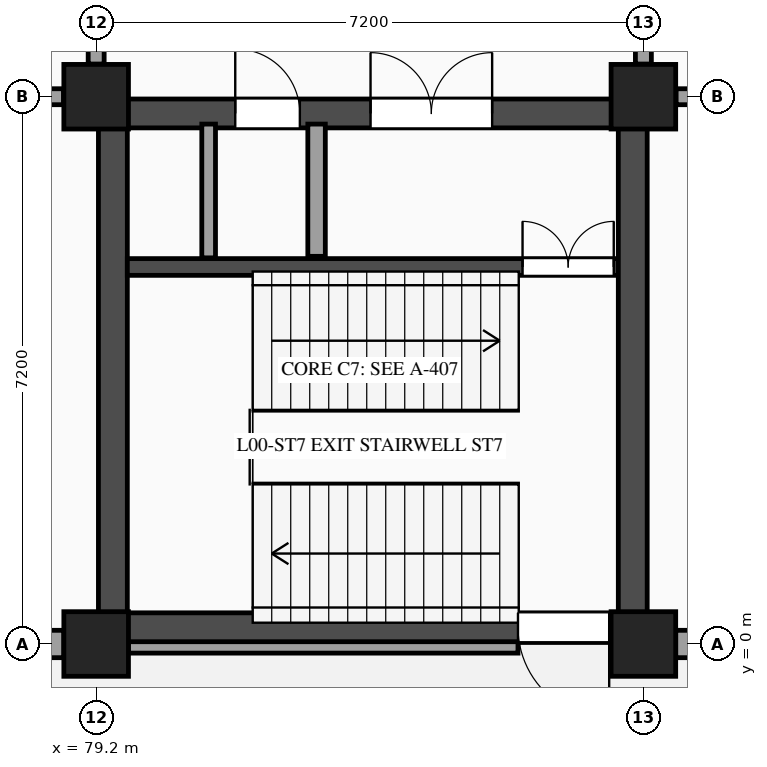
"""IFC4 building model, lengths in metres.
Left out: names, types, materials, properties, quantities, classifications, styles, units other than length and angle.
Written with IfcOpenShell. Run it as: python <this file> out.ifc"""

import sys

from ifc_helpers import new_model, si_unit, direction, frame, frame_2d, origin, origin_2d, place, context, subcontext, project, spatial, rectangle, extrude, element, fill, save


model = new_model("IFC4")
c1 = context("Model", 3, precision=1e-05, world=origin(), true_north=direction((0.0, 1.0)))
c2 = subcontext(c1, "Body", "Model", "MODEL_VIEW")
j1 = project(units=[si_unit("LENGTHUNIT", "METRE"), si_unit("PLANEANGLEUNIT", "RADIAN")], contexts=[c1])
p1 = place(None, origin())
s1 = spatial("IfcSite", under=j1, at=p1, CompositionType="ELEMENT")
p2 = place(p1, origin())
s2 = spatial("IfcBuilding", under=s1, at=p2, CompositionType="ELEMENT")
p3 = place(p2, origin())
s3 = spatial("IfcBuildingStorey", under=s2, at=p3, CompositionType="ELEMENT", Elevation=0.0)
for number, where, z_axis, x_axis in (
    (1, (79.2, 0.0, 0.0), (0.0, 0.0, 1.0), (1.0, 0.0, 0.0)),
    (2, (79.2, 7.2, 0.0), (0.0, 0.0, 1.0), (1.0, 0.0, 0.0)),
    (3, (86.4, 0.0, 0.0), (0.0, 0.0, 1.0), (1.0, 0.0, 0.0)),
    (4, (86.4, 7.2, 0.0), (0.0, 0.0, 1.0), (1.0, 0.0, 0.0)),
):
    element("IfcColumn", number, at=place(p3, frame(where, z_axis=z_axis, x_axis=x_axis)), inside=s3, PredefinedType="COLUMN", context=c2, shape_type="SweptSolid", body=[
        extrude(rectangle(XDim=0.85, YDim=0.85, at=origin_2d()), origin(), (0.0, 0.0, 1.0), 5.4),
    ])
p4 = place(p3, frame((93.225, 0.0, 0.0), z_axis=(0.0, 0.0, 1.0), x_axis=(-1.0, 0.0, 0.0)))
e5 = element("IfcWall", 5, at=p4, inside=s3, PredefinedType="STANDARD", context=c2, shape_type="SweptSolid", body=[
    extrude(rectangle(XDim=6.4, YDim=0.36, at=frame_2d((3.2, 0.0))), origin(), (0.0, 0.0, 1.0), 4.37),
])
p5 = place(p4, frame((1.345, 0.0, 1.15)))
e6 = element("IfcOpeningElement", 6, at=p5, cuts=e5, PredefinedType="OPENING", context=c2, shape_type="SweptSolid", body=[
    extrude(rectangle(XDim=1.15, YDim=1.2, at=frame_2d((0.575, 0.6))), frame((0.0, 0.19, 0.0), z_axis=(0.0, -1.0, 0.0), x_axis=(1.0, 0.0, 0.0)), (0.0, 0.0, 1.0), 0.38),
])
p6 = place(p4, frame((3.905, 0.0, 1.15)))
e7 = element("IfcOpeningElement", 7, at=p6, cuts=e5, PredefinedType="OPENING", context=c2, shape_type="SweptSolid", body=[
    extrude(rectangle(XDim=1.15, YDim=1.2, at=frame_2d((0.575, 0.6))), frame((0.0, 0.19, 0.0), z_axis=(0.0, -1.0, 0.0), x_axis=(1.0, 0.0, 0.0)), (0.0, 0.0, 1.0), 0.38),
])
p7 = place(p3, frame((84.75, 0.0, 0.0), z_axis=(0.0, 0.0, 1.0), x_axis=(-1.0, 0.0, 0.0)))
e8 = element("IfcWall", 8, at=p7, inside=s3, PredefinedType="STANDARD", context=c2, shape_type="SweptSolid", body=[
    extrude(rectangle(XDim=5.125, YDim=0.24, at=frame_2d((2.562, 0.0))), origin(), (0.0, 0.0, 1.0), 4.37),
])
p8 = place(p3, frame((78.775, 0.0, 0.0), z_axis=(0.0, 0.0, 1.0), x_axis=(-1.0, 0.0, 0.0)))
e9 = element("IfcWall", 9, at=p8, inside=s3, PredefinedType="STANDARD", context=c2, shape_type="SweptSolid", body=[
    extrude(rectangle(XDim=6.4, YDim=0.36, at=frame_2d((3.2, 0.0))), origin(), (0.0, 0.0, 1.0), 4.37),
])
p9 = place(p8, frame((1.495, 0.0, 1.15)))
e10 = element("IfcOpeningElement", 10, at=p9, cuts=e9, PredefinedType="OPENING", context=c2, shape_type="SweptSolid", body=[
    extrude(rectangle(XDim=0.85, YDim=1.25, at=frame_2d((0.425, 0.625))), frame((0.0, 0.19, 0.0), z_axis=(0.0, -1.0, 0.0), x_axis=(1.0, 0.0, 0.0)), (0.0, 0.0, 1.0), 0.38),
])
p10 = place(p8, frame((4.055, 0.0, 1.15)))
e11 = element("IfcOpeningElement", 11, at=p10, cuts=e9, PredefinedType="OPENING", context=c2, shape_type="SweptSolid", body=[
    extrude(rectangle(XDim=0.85, YDim=1.25, at=frame_2d((0.425, 0.625))), frame((0.0, 0.19, 0.0), z_axis=(0.0, -1.0, 0.0), x_axis=(1.0, 0.0, 0.0)), (0.0, 0.0, 1.0), 0.38),
])
p11 = place(p3, frame((79.61, 0.22, 0.0), z_axis=(0.0, 0.0, 1.0), x_axis=(1.0, 0.0, 0.0)))
e12 = element("IfcWall", 12, at=p11, inside=s3, PredefinedType="SHEAR", context=c2, shape_type="SweptSolid", body=[
    extrude(rectangle(XDim=6.46, YDim=0.38, at=frame_2d((3.23, 0.0))), origin(), (0.0, 0.0, 1.0), 5.09),
])
p12 = place(p11, frame((5.14, 0.0, 0.0)))
e13 = element("IfcOpeningElement", 13, at=p12, cuts=e12, PredefinedType="OPENING", context=c2, shape_type="SweptSolid", body=[
    extrude(rectangle(XDim=1.2, YDim=2.2, at=frame_2d((0.6, 1.1))), frame((0.0, 0.2, 0.0), z_axis=(0.0, -1.0, 0.0), x_axis=(1.0, 0.0, 0.0)), (0.0, 0.0, 1.0), 0.4),
])
p13 = place(p3, frame((79.42, 7.17, 0.0), z_axis=(0.0, 0.0, 1.0), x_axis=(0.0, -1.0, 0.0)))
e14 = element("IfcWall", 14, at=p13, inside=s3, PredefinedType="SHEAR", context=c2, shape_type="SweptSolid", body=[
    extrude(rectangle(XDim=7.14, YDim=0.38, at=frame_2d((3.57, 0.0))), origin(), (0.0, 0.0, 1.0), 5.09),
])
p14 = place(p3, frame((79.61, 6.98, 0.0), z_axis=(0.0, 0.0, 1.0), x_axis=(1.0, 0.0, 0.0)))
e15 = element("IfcWall", 15, at=p14, inside=s3, PredefinedType="SHEAR", context=c2, shape_type="SweptSolid", body=[
    extrude(rectangle(XDim=6.46, YDim=0.38, at=frame_2d((3.23, 0.0))), origin(), (0.0, 0.0, 1.0), 5.09),
])
p15 = place(p14, frame((1.42, 0.0, 0.0)))
e16 = element("IfcOpeningElement", 16, at=p15, cuts=e15, PredefinedType="OPENING", context=c2, shape_type="SweptSolid", body=[
    extrude(rectangle(XDim=0.85, YDim=2.1, at=frame_2d((0.425, 1.05))), frame((0.0, 0.2, 0.0), z_axis=(0.0, -1.0, 0.0), x_axis=(1.0, 0.0, 0.0)), (0.0, 0.0, 1.0), 0.4),
])
p16 = place(p14, frame((3.2, 0.0, 0.0)))
e17 = element("IfcOpeningElement", 17, at=p16, cuts=e15, PredefinedType="OPENING", context=c2, shape_type="SweptSolid", body=[
    extrude(rectangle(XDim=1.6, YDim=2.2, at=frame_2d((0.8, 1.1))), frame((0.0, 0.2, 0.0), z_axis=(0.0, -1.0, 0.0), x_axis=(1.0, 0.0, 0.0)), (0.0, 0.0, 1.0), 0.4),
])
p17 = place(p3, frame((79.61, 4.96, 0.0), z_axis=(0.0, 0.0, 1.0), x_axis=(1.0, 0.0, 0.0)))
e18 = element("IfcWall", 18, at=p17, inside=s3, PredefinedType="SHEAR", context=c2, shape_type="SweptSolid", body=[
    extrude(rectangle(XDim=6.46, YDim=0.22, at=frame_2d((3.23, 0.0))), origin(), (0.0, 0.0, 1.0), 5.09),
])
p18 = place(p17, frame((5.2, 0.0, 0.0)))
e19 = element("IfcOpeningElement", 19, at=p18, cuts=e18, PredefinedType="OPENING", context=c2, shape_type="SweptSolid", body=[
    extrude(rectangle(XDim=1.2, YDim=2.2, at=frame_2d((0.6, 1.1))), frame((0.0, 0.12, 0.0), z_axis=(0.0, -1.0, 0.0), x_axis=(1.0, 0.0, 0.0)), (0.0, 0.0, 1.0), 0.24),
])
p19 = place(p3, frame((82.1, 5.1, 0.0), z_axis=(0.0, 0.0, 1.0), x_axis=(0.0, 1.0, 0.0)))
e20 = element("IfcWall", 20, at=p19, inside=s3, PredefinedType="PARTITIONING", context=c2, shape_type="SweptSolid", body=[
    extrude(rectangle(XDim=1.74, YDim=0.23, at=frame_2d((0.87, 0.0))), origin(), (0.0, 0.0, 1.0), 5.09),
])
p20 = place(p3, frame((80.68, 5.08, 0.0), z_axis=(0.0, 0.0, 1.0), x_axis=(0.0, 1.0, 0.0)))
e21 = element("IfcWall", 21, at=p20, inside=s3, PredefinedType="PARTITIONING", context=c2, shape_type="SweptSolid", body=[
    extrude(rectangle(XDim=1.76, YDim=0.18, at=frame_2d((0.88, 0.0))), origin(), (0.0, 0.0, 1.0), 5.09),
])
p21 = place(p3, frame((86.26, 0.03, 0.0), z_axis=(0.0, 0.0, 1.0), x_axis=(0.0, 1.0, 0.0)))
e22 = element("IfcWall", 22, at=p21, inside=s3, PredefinedType="SHEAR", context=c2, shape_type="SweptSolid", body=[
    extrude(rectangle(XDim=7.14, YDim=0.38, at=frame_2d((3.57, 0.0))), origin(), (0.0, 0.0, 1.0), 5.09),
])
p22 = place(p3, frame((72.38, 7.2, 0.0), z_axis=(0.0, 0.0, 1.0), x_axis=(1.0, 0.0, 0.0)))
e23 = element("IfcWall", 23, at=p22, inside=s3, PredefinedType="PARTITIONING", context=c2, shape_type="SweptSolid", body=[
    extrude(rectangle(XDim=6.39, YDim=0.21, at=frame_2d((3.195, 0.0))), origin(), (0.0, 0.0, 1.0), 4.31),
])
p23 = place(p3, frame((79.2, 7.63, 0.0), z_axis=(0.0, 0.0, 1.0), x_axis=(0.0, 1.0, 0.0)))
e24 = element("IfcWall", 24, at=p23, inside=s3, PredefinedType="PARTITIONING", context=c2, shape_type="SweptSolid", body=[
    extrude(rectangle(XDim=6.34, YDim=0.21, at=frame_2d((3.17, 0.0))), origin(), (0.0, 0.0, 1.0), 4.405),
])
p24 = place(p23, frame((2.37, 0.0, 0.0)))
e25 = element("IfcOpeningElement", 25, at=p24, cuts=e24, PredefinedType="OPENING", context=c2, shape_type="SweptSolid", body=[
    extrude(rectangle(XDim=1.6, YDim=2.2, at=frame_2d((0.8, 1.1))), frame((0.0, 0.115, 0.0), z_axis=(0.0, -1.0, 0.0), x_axis=(1.0, 0.0, 0.0)), (0.0, 0.0, 1.0), 0.23),
])
p25 = place(p3, frame((86.4, 7.63, 0.0), z_axis=(0.0, 0.0, 1.0), x_axis=(0.0, 1.0, 0.0)))
e26 = element("IfcWall", 26, at=p25, inside=s3, PredefinedType="PARTITIONING", context=c2, shape_type="SweptSolid", body=[
    extrude(rectangle(XDim=6.34, YDim=0.21, at=frame_2d((3.17, 0.0))), origin(), (0.0, 0.0, 1.0), 4.405),
])
p26 = place(p25, frame((2.37, 0.0, 0.0)))
e27 = element("IfcOpeningElement", 27, at=p26, cuts=e26, PredefinedType="OPENING", context=c2, shape_type="SweptSolid", body=[
    extrude(rectangle(XDim=1.6, YDim=2.2, at=frame_2d((0.8, 1.1))), frame((0.0, 0.115, 0.0), z_axis=(0.0, -1.0, 0.0), x_axis=(1.0, 0.0, 0.0)), (0.0, 0.0, 1.0), 0.23),
])
p27 = place(p3, frame((86.83, 7.2, 0.0), z_axis=(0.0, 0.0, 1.0), x_axis=(1.0, 0.0, 0.0)))
e28 = element("IfcWall", 28, at=p27, inside=s3, PredefinedType="PARTITIONING", context=c2, shape_type="SweptSolid", body=[
    extrude(rectangle(XDim=6.39, YDim=0.21, at=frame_2d((3.195, 0.0))), origin(), (0.0, 0.0, 1.0), 4.35),
])
p28 = place(p27, frame((2.645, 0.0, 0.0)))
e29 = element("IfcOpeningElement", 29, at=p28, cuts=e28, PredefinedType="OPENING", context=c2, shape_type="SweptSolid", body=[
    extrude(rectangle(XDim=1.1, YDim=2.15, at=frame_2d((0.55, 1.075))), frame((0.0, 0.115, 0.0), z_axis=(0.0, -1.0, 0.0), x_axis=(1.0, 0.0, 0.0)), (0.0, 0.0, 1.0), 0.23),
])
p29 = place(p15, origin())
e30 = element("IfcDoor", 30, at=p29, inside=s3, OperationType="SINGLE_SWING_LEFT", PredefinedType="DOOR", context=c2, shape_type="SweptSolid", body=[
    extrude(rectangle(XDim=0.85, YDim=2.1, at=frame_2d((0.425, 1.05))), frame((0.0, 0.025, 0.0), z_axis=(0.0, -1.0, 0.0), x_axis=(1.0, 0.0, 0.0)), (0.0, 0.0, 1.0), 0.05),
])
fill(e16, e30)
p30 = place(p12, frame((1.2, 0.0, 0.0), z_axis=(0.0, 0.0, 1.0), x_axis=(-1.0, 0.0, 0.0)))
e31 = element("IfcDoor", 31, at=p30, inside=s3, OperationType="SINGLE_SWING_LEFT", PredefinedType="DOOR", context=c2, shape_type="SweptSolid", body=[
    extrude(rectangle(XDim=1.2, YDim=2.2, at=frame_2d((0.6, 1.1))), frame((0.0, 0.025, 0.0), z_axis=(0.0, -1.0, 0.0), x_axis=(1.0, 0.0, 0.0)), (0.0, 0.0, 1.0), 0.05),
])
fill(e13, e31)
p31 = place(p18, frame((1.2, 0.0, 0.0), z_axis=(0.0, 0.0, 1.0), x_axis=(-1.0, 0.0, 0.0)))
e32 = element("IfcDoor", 32, at=p31, inside=s3, OperationType="DOUBLE_DOOR_SINGLE_SWING", PredefinedType="DOOR", context=c2, shape_type="SweptSolid", body=[
    extrude(rectangle(XDim=1.2, YDim=2.2, at=frame_2d((0.6, 1.1))), frame((0.0, 0.025, 0.0), z_axis=(0.0, -1.0, 0.0), x_axis=(1.0, 0.0, 0.0)), (0.0, 0.0, 1.0), 0.05),
])
fill(e19, e32)
p32 = place(p16, origin())
e33 = element("IfcDoor", 33, at=p32, inside=s3, OperationType="DOUBLE_DOOR_SINGLE_SWING", PredefinedType="DOOR", context=c2, shape_type="SweptSolid", body=[
    extrude(rectangle(XDim=1.6, YDim=2.2, at=frame_2d((0.8, 1.1))), frame((0.0, 0.025, 0.0), z_axis=(0.0, -1.0, 0.0), x_axis=(1.0, 0.0, 0.0)), (0.0, 0.0, 1.0), 0.05),
])
fill(e17, e33)
save(model, sys.argv[1])
